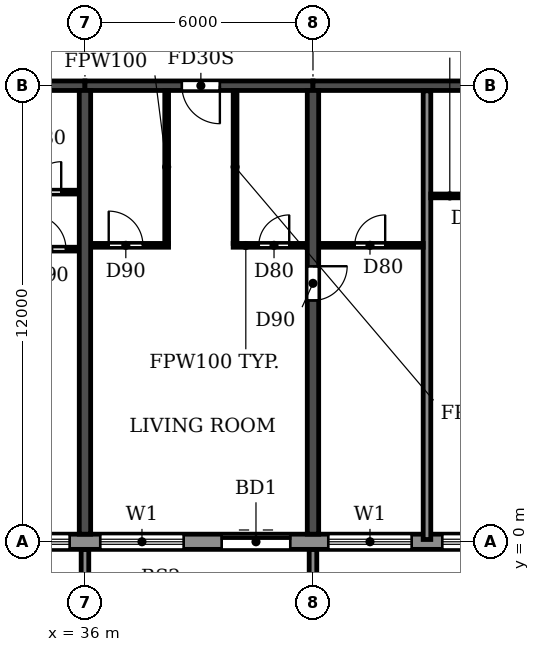
"""IFC4 building model, lengths in metres.
Left out: names, types, materials, properties, quantities, classifications, styles, units other than length and angle.
Written with IfcOpenShell. Run it as: python <this file> out.ifc"""

import sys

from ifc_helpers import new_model, si_unit, direction, frame, frame_2d, origin, place, context, subcontext, project, spatial, polyline, rectangle, outline, extrude, source, transform, mapped, element, fill, save


model = new_model("IFC4")
c1 = context("Model", 3, precision=1e-05, world=origin(), true_north=direction((0.0, 1.0)))
c2 = subcontext(c1, "Body", "Model", "MODEL_VIEW")
j1 = project(units=[si_unit("LENGTHUNIT", "METRE"), si_unit("PLANEANGLEUNIT", "RADIAN")], contexts=[c1])
p1 = place(None, origin())
s1 = spatial("IfcSite", under=j1, at=p1, CompositionType="ELEMENT")
p2 = place(p1, origin())
s2 = spatial("IfcBuilding", under=s1, at=p2, CompositionType="ELEMENT")
p3 = place(p2, frame((0.0, 0.0, 125.7)))
s3 = spatial("IfcBuildingStorey", under=s2, at=p3, CompositionType="ELEMENT", Elevation=125.7)
p4 = place(p3, frame((36.0, 0.2, 0.0), z_axis=(0.0, 0.0, 1.0), x_axis=(0.0, 1.0, 0.0)))
e1 = element("IfcWall", 1, at=p4, inside=s3, PredefinedType="SHEAR", context=c2, shape_type="SweptSolid", body=[
    extrude(rectangle(XDim=11.675, YDim=0.3, at=frame_2d((5.837, 0.0))), origin(), (0.0, 0.0, 1.0), 3.07),
])
p5 = place(p3, frame((42.0, 0.2, 0.0), z_axis=(0.0, 0.0, 1.0), x_axis=(0.0, 1.0, 0.0)))
e2 = element("IfcWall", 2, at=p5, inside=s3, PredefinedType="SHEAR", context=c2, shape_type="SweptSolid", body=[
    extrude(rectangle(XDim=11.675, YDim=0.3, at=frame_2d((5.837, 0.0))), origin(), (0.0, 0.0, 1.0), 3.07),
])
p6 = place(p5, frame((6.15, 0.0, 0.0)))
e3 = element("IfcOpeningElement", 3, at=p6, cuts=e2, PredefinedType="OPENING", context=c2, shape_type="SweptSolid", body=[
    extrude(rectangle(XDim=0.9, YDim=2.1, at=frame_2d((0.45, 1.05))), frame((0.0, 0.16, 0.0), z_axis=(0.0, -1.0, 0.0), x_axis=(1.0, 0.0, 0.0)), (0.0, 0.0, 1.0), 0.32),
])
p7 = place(p3, frame((30.0, 12.0, 0.0), z_axis=(0.0, 0.0, 1.0), x_axis=(1.0, 0.0, 0.0)))
e4 = element("IfcWall", 4, at=p7, inside=s3, PredefinedType="SHEAR", context=c2, shape_type="SweptSolid", body=[
    extrude(rectangle(XDim=6.0, YDim=0.25, at=frame_2d((3.0, 0.0))), origin(), (0.0, 0.0, 1.0), 2.47),
])
p8 = place(p7, frame((2.55, 0.0, 0.0)))
e5 = element("IfcOpeningElement", 5, at=p8, cuts=e4, PredefinedType="OPENING", context=c2, shape_type="SweptSolid", body=[
    extrude(rectangle(XDim=1.0, YDim=2.1, at=frame_2d((0.5, 1.05))), frame((0.0, 0.135, 0.0), z_axis=(0.0, -1.0, 0.0), x_axis=(1.0, 0.0, 0.0)), (0.0, 0.0, 1.0), 0.27),
])
p9 = place(p3, frame((36.0, 12.0, 0.0), z_axis=(0.0, 0.0, 1.0), x_axis=(1.0, 0.0, 0.0)))
e6 = element("IfcWall", 6, at=p9, inside=s3, PredefinedType="SHEAR", context=c2, shape_type="SweptSolid", body=[
    extrude(rectangle(XDim=6.0, YDim=0.25, at=frame_2d((3.0, 0.0))), origin(), (0.0, 0.0, 1.0), 2.47),
])
p10 = place(p9, frame((2.55, 0.0, 0.0)))
e7 = element("IfcOpeningElement", 7, at=p10, cuts=e6, PredefinedType="OPENING", context=c2, shape_type="SweptSolid", body=[
    extrude(rectangle(XDim=1.0, YDim=2.1, at=frame_2d((0.5, 1.05))), frame((0.0, 0.135, 0.0), z_axis=(0.0, -1.0, 0.0), x_axis=(1.0, 0.0, 0.0)), (0.0, 0.0, 1.0), 0.27),
])
p11 = place(p3, frame((42.0, 12.0, 0.0), z_axis=(0.0, 0.0, 1.0), x_axis=(1.0, 0.0, 0.0)))
e8 = element("IfcWall", 8, at=p11, inside=s3, PredefinedType="SHEAR", context=c2, shape_type="SweptSolid", body=[
    extrude(rectangle(XDim=6.0, YDim=0.25, at=frame_2d((3.0, 0.0))), origin(), (0.0, 0.0, 1.0), 2.47),
])
p12 = place(p3, frame((16.683, 0.0, 0.0), z_axis=(0.0, 0.0, 1.0), x_axis=(1.0, 0.0, 0.0)))
e9 = element("IfcWall", 9, at=p12, inside=s3, PredefinedType="STANDARD", context=c2, shape_type="SweptSolid", body=[
    extrude(rectangle(XDim=68.634, YDim=0.4, at=frame_2d((34.317, 0.0))), origin(), (0.0, 0.0, 1.0), 3.07),
])
p13 = place(p12, frame((1.717, 0.0, 0.9)))
e10 = element("IfcOpeningElement", 10, at=p13, cuts=e9, PredefinedType="OPENING", context=c2, shape_type="SweptSolid", body=[
    extrude(rectangle(XDim=2.2, YDim=1.5, at=frame_2d((1.1, 0.75))), frame((0.0, 0.21, 0.0), z_axis=(0.0, -1.0, 0.0), x_axis=(1.0, 0.0, 0.0)), (0.0, 0.0, 1.0), 0.42),
])
p14 = place(p12, frame((4.717, 0.0, 0.9)))
e11 = element("IfcOpeningElement", 11, at=p14, cuts=e9, PredefinedType="OPENING", context=c2, shape_type="SweptSolid", body=[
    extrude(rectangle(XDim=2.2, YDim=1.5, at=frame_2d((1.1, 0.75))), frame((0.0, 0.21, 0.0), z_axis=(0.0, -1.0, 0.0), x_axis=(1.0, 0.0, 0.0)), (0.0, 0.0, 1.0), 0.42),
])
p15 = place(p12, frame((7.717, 0.0, 0.9)))
e12 = element("IfcOpeningElement", 12, at=p15, cuts=e9, PredefinedType="OPENING", context=c2, shape_type="SweptSolid", body=[
    extrude(rectangle(XDim=2.2, YDim=1.5, at=frame_2d((1.1, 0.75))), frame((0.0, 0.21, 0.0), z_axis=(0.0, -1.0, 0.0), x_axis=(1.0, 0.0, 0.0)), (0.0, 0.0, 1.0), 0.42),
])
p16 = place(p12, frame((10.717, 0.0, 0.9)))
e13 = element("IfcOpeningElement", 13, at=p16, cuts=e9, PredefinedType="OPENING", context=c2, shape_type="SweptSolid", body=[
    extrude(rectangle(XDim=2.2, YDim=1.5, at=frame_2d((1.1, 0.75))), frame((0.0, 0.21, 0.0), z_axis=(0.0, -1.0, 0.0), x_axis=(1.0, 0.0, 0.0)), (0.0, 0.0, 1.0), 0.42),
])
p17 = place(p12, frame((13.717, 0.0, 0.9)))
e14 = element("IfcOpeningElement", 14, at=p17, cuts=e9, PredefinedType="OPENING", context=c2, shape_type="SweptSolid", body=[
    extrude(rectangle(XDim=2.2, YDim=1.5, at=frame_2d((1.1, 0.75))), frame((0.0, 0.21, 0.0), z_axis=(0.0, -1.0, 0.0), x_axis=(1.0, 0.0, 0.0)), (0.0, 0.0, 1.0), 0.42),
])
p18 = place(p12, frame((16.717, 0.0, 0.9)))
e15 = element("IfcOpeningElement", 15, at=p18, cuts=e9, PredefinedType="OPENING", context=c2, shape_type="SweptSolid", body=[
    extrude(rectangle(XDim=2.2, YDim=1.5, at=frame_2d((1.1, 0.75))), frame((0.0, 0.21, 0.0), z_axis=(0.0, -1.0, 0.0), x_axis=(1.0, 0.0, 0.0)), (0.0, 0.0, 1.0), 0.42),
])
p19 = place(p12, frame((19.717, 0.0, 0.9)))
e16 = element("IfcOpeningElement", 16, at=p19, cuts=e9, PredefinedType="OPENING", context=c2, shape_type="SweptSolid", body=[
    extrude(rectangle(XDim=2.2, YDim=1.5, at=frame_2d((1.1, 0.75))), frame((0.0, 0.21, 0.0), z_axis=(0.0, -1.0, 0.0), x_axis=(1.0, 0.0, 0.0)), (0.0, 0.0, 1.0), 0.42),
])
p20 = place(p12, frame((22.917, 0.0, 0.0)))
e17 = element("IfcOpeningElement", 17, at=p20, cuts=e9, PredefinedType="OPENING", context=c2, shape_type="SweptSolid", body=[
    extrude(rectangle(XDim=1.8, YDim=2.4, at=frame_2d((0.9, 1.2))), frame((0.0, 0.21, 0.0), z_axis=(0.0, -1.0, 0.0), x_axis=(1.0, 0.0, 0.0)), (0.0, 0.0, 1.0), 0.42),
])
p21 = place(p12, frame((25.717, 0.0, 0.9)))
e18 = element("IfcOpeningElement", 18, at=p21, cuts=e9, PredefinedType="OPENING", context=c2, shape_type="SweptSolid", body=[
    extrude(rectangle(XDim=2.2, YDim=1.5, at=frame_2d((1.1, 0.75))), frame((0.0, 0.21, 0.0), z_axis=(0.0, -1.0, 0.0), x_axis=(1.0, 0.0, 0.0)), (0.0, 0.0, 1.0), 0.42),
])
p22 = place(p12, frame((28.717, 0.0, 0.9)))
e19 = element("IfcOpeningElement", 19, at=p22, cuts=e9, PredefinedType="OPENING", context=c2, shape_type="SweptSolid", body=[
    extrude(rectangle(XDim=2.2, YDim=1.5, at=frame_2d((1.1, 0.75))), frame((0.0, 0.21, 0.0), z_axis=(0.0, -1.0, 0.0), x_axis=(1.0, 0.0, 0.0)), (0.0, 0.0, 1.0), 0.42),
])
p23 = place(p12, frame((31.717, 0.0, 0.9)))
e20 = element("IfcOpeningElement", 20, at=p23, cuts=e9, PredefinedType="OPENING", context=c2, shape_type="SweptSolid", body=[
    extrude(rectangle(XDim=2.2, YDim=1.5, at=frame_2d((1.1, 0.75))), frame((0.0, 0.21, 0.0), z_axis=(0.0, -1.0, 0.0), x_axis=(1.0, 0.0, 0.0)), (0.0, 0.0, 1.0), 0.42),
])
p24 = place(p12, frame((34.917, 0.0, 0.0)))
e21 = element("IfcOpeningElement", 21, at=p24, cuts=e9, PredefinedType="OPENING", context=c2, shape_type="SweptSolid", body=[
    extrude(rectangle(XDim=1.8, YDim=2.4, at=frame_2d((0.9, 1.2))), frame((0.0, 0.21, 0.0), z_axis=(0.0, -1.0, 0.0), x_axis=(1.0, 0.0, 0.0)), (0.0, 0.0, 1.0), 0.42),
])
p25 = place(p12, frame((37.717, 0.0, 0.9)))
e22 = element("IfcOpeningElement", 22, at=p25, cuts=e9, PredefinedType="OPENING", context=c2, shape_type="SweptSolid", body=[
    extrude(rectangle(XDim=2.2, YDim=1.5, at=frame_2d((1.1, 0.75))), frame((0.0, 0.21, 0.0), z_axis=(0.0, -1.0, 0.0), x_axis=(1.0, 0.0, 0.0)), (0.0, 0.0, 1.0), 0.42),
])
p26 = place(p12, frame((40.717, 0.0, 0.9)))
e23 = element("IfcOpeningElement", 23, at=p26, cuts=e9, PredefinedType="OPENING", context=c2, shape_type="SweptSolid", body=[
    extrude(rectangle(XDim=2.2, YDim=1.5, at=frame_2d((1.1, 0.75))), frame((0.0, 0.21, 0.0), z_axis=(0.0, -1.0, 0.0), x_axis=(1.0, 0.0, 0.0)), (0.0, 0.0, 1.0), 0.42),
])
p27 = place(p12, frame((43.717, 0.0, 0.9)))
e24 = element("IfcOpeningElement", 24, at=p27, cuts=e9, PredefinedType="OPENING", context=c2, shape_type="SweptSolid", body=[
    extrude(rectangle(XDim=2.2, YDim=1.5, at=frame_2d((1.1, 0.75))), frame((0.0, 0.21, 0.0), z_axis=(0.0, -1.0, 0.0), x_axis=(1.0, 0.0, 0.0)), (0.0, 0.0, 1.0), 0.42),
])
p28 = place(p12, frame((46.917, 0.0, 0.0)))
e25 = element("IfcOpeningElement", 25, at=p28, cuts=e9, PredefinedType="OPENING", context=c2, shape_type="SweptSolid", body=[
    extrude(rectangle(XDim=1.8, YDim=2.4, at=frame_2d((0.9, 1.2))), frame((0.0, 0.21, 0.0), z_axis=(0.0, -1.0, 0.0), x_axis=(1.0, 0.0, 0.0)), (0.0, 0.0, 1.0), 0.42),
])
p29 = place(p12, frame((49.717, 0.0, 0.9)))
e26 = element("IfcOpeningElement", 26, at=p29, cuts=e9, PredefinedType="OPENING", context=c2, shape_type="SweptSolid", body=[
    extrude(rectangle(XDim=2.2, YDim=1.5, at=frame_2d((1.1, 0.75))), frame((0.0, 0.21, 0.0), z_axis=(0.0, -1.0, 0.0), x_axis=(1.0, 0.0, 0.0)), (0.0, 0.0, 1.0), 0.42),
])
p30 = place(p12, frame((52.717, 0.0, 0.9)))
e27 = element("IfcOpeningElement", 27, at=p30, cuts=e9, PredefinedType="OPENING", context=c2, shape_type="SweptSolid", body=[
    extrude(rectangle(XDim=2.2, YDim=1.5, at=frame_2d((1.1, 0.75))), frame((0.0, 0.21, 0.0), z_axis=(0.0, -1.0, 0.0), x_axis=(1.0, 0.0, 0.0)), (0.0, 0.0, 1.0), 0.42),
])
p31 = place(p12, frame((55.717, 0.0, 0.9)))
e28 = element("IfcOpeningElement", 28, at=p31, cuts=e9, PredefinedType="OPENING", context=c2, shape_type="SweptSolid", body=[
    extrude(rectangle(XDim=2.2, YDim=1.5, at=frame_2d((1.1, 0.75))), frame((0.0, 0.21, 0.0), z_axis=(0.0, -1.0, 0.0), x_axis=(1.0, 0.0, 0.0)), (0.0, 0.0, 1.0), 0.42),
])
p32 = place(p12, frame((58.917, 0.0, 0.0)))
e29 = element("IfcOpeningElement", 29, at=p32, cuts=e9, PredefinedType="OPENING", context=c2, shape_type="SweptSolid", body=[
    extrude(rectangle(XDim=1.8, YDim=2.4, at=frame_2d((0.9, 1.2))), frame((0.0, 0.21, 0.0), z_axis=(0.0, -1.0, 0.0), x_axis=(1.0, 0.0, 0.0)), (0.0, 0.0, 1.0), 0.42),
])
p33 = place(p12, frame((61.717, 0.0, 0.9)))
e30 = element("IfcOpeningElement", 30, at=p33, cuts=e9, PredefinedType="OPENING", context=c2, shape_type="SweptSolid", body=[
    extrude(rectangle(XDim=2.2, YDim=1.5, at=frame_2d((1.1, 0.75))), frame((0.0, 0.21, 0.0), z_axis=(0.0, -1.0, 0.0), x_axis=(1.0, 0.0, 0.0)), (0.0, 0.0, 1.0), 0.42),
])
p34 = place(p12, frame((64.717, 0.0, 0.9)))
e31 = element("IfcOpeningElement", 31, at=p34, cuts=e9, PredefinedType="OPENING", context=c2, shape_type="SweptSolid", body=[
    extrude(rectangle(XDim=2.2, YDim=1.5, at=frame_2d((1.1, 0.75))), frame((0.0, 0.21, 0.0), z_axis=(0.0, -1.0, 0.0), x_axis=(1.0, 0.0, 0.0)), (0.0, 0.0, 1.0), 0.42),
])
m1 = source(origin(), c2, "Body", "SweptSolid", [
    extrude(outline(polyline([(0.0, 0.0), (0.2, 0.0), (0.2, 1.65), (0.0, 1.65), (0.0, 0.0)])), origin(), (0.0, 0.0, 1.0), 3.1),
])
for number, where in (
    (32, (35.9, -1.85, 0.0)),
    (33, (41.9, -1.85, 0.0)),
):
    element("IfcWall", number, at=place(p3, frame(where)), inside=s3, PredefinedType="STANDARD", context=c2, shape_type="MappedRepresentation", body=[
        mapped(m1, transform((0.0, 0.0, 0.0))),
    ])
p35 = place(p3, frame((45.0, 0.06, 0.0), z_axis=(0.0, 0.0, 1.0), x_axis=(0.0, 1.0, 0.0)))
e34 = element("IfcWall", 34, at=p35, inside=s3, PredefinedType="PARTITIONING", context=c2, shape_type="SweptSolid", body=[
    extrude(rectangle(XDim=11.805, YDim=0.2, at=frame_2d((5.902, 0.0))), origin(), (0.0, 0.0, 1.0), 3.07),
])
p36 = place(p3, frame((32.95, 7.7, 0.0), z_axis=(0.0, 0.0, 1.0), x_axis=(1.0, 0.0, 0.0)))
e35 = element("IfcWall", 35, at=p36, inside=s3, PredefinedType="PARTITIONING", context=c2, shape_type="SweptSolid", body=[
    extrude(rectangle(XDim=2.89, YDim=0.1, at=frame_2d((1.445, 0.0))), origin(), (0.0, 0.0, 1.0), 3.07),
])
p37 = place(p36, frame((1.65, 0.0, 0.0)))
e36 = element("IfcOpeningElement", 36, at=p37, cuts=e35, PredefinedType="OPENING", context=c2, shape_type="SweptSolid", body=[
    extrude(rectangle(XDim=0.9, YDim=2.1, at=frame_2d((0.45, 1.05))), frame((0.0, 0.06, 0.0), z_axis=(0.0, -1.0, 0.0), x_axis=(1.0, 0.0, 0.0)), (0.0, 0.0, 1.0), 0.12),
])
p38 = place(p3, frame((36.16, 7.8, 0.0), z_axis=(0.0, 0.0, 1.0), x_axis=(1.0, 0.0, 0.0)))
e37 = element("IfcWall", 37, at=p38, inside=s3, PredefinedType="PARTITIONING", context=c2, shape_type="SweptSolid", body=[
    extrude(rectangle(XDim=2.04, YDim=0.1, at=frame_2d((1.02, 0.0))), origin(), (0.0, 0.0, 1.0), 3.07),
])
p39 = place(p38, frame((0.465, 0.0, 0.0)))
e38 = element("IfcOpeningElement", 38, at=p39, cuts=e37, PredefinedType="OPENING", context=c2, shape_type="SweptSolid", body=[
    extrude(rectangle(XDim=0.9, YDim=2.1, at=frame_2d((0.45, 1.05))), frame((0.0, 0.06, 0.0), z_axis=(0.0, -1.0, 0.0), x_axis=(1.0, 0.0, 0.0)), (0.0, 0.0, 1.0), 0.12),
])
p40 = place(p3, frame((39.9, 7.8, 0.0), z_axis=(0.0, 0.0, 1.0), x_axis=(1.0, 0.0, 0.0)))
e39 = element("IfcWall", 39, at=p40, inside=s3, PredefinedType="PARTITIONING", context=c2, shape_type="SweptSolid", body=[
    extrude(rectangle(XDim=1.94, YDim=0.1, at=frame_2d((0.97, 0.0))), origin(), (0.0, 0.0, 1.0), 3.07),
])
p41 = place(p40, frame((0.675, 0.0, 0.0)))
e40 = element("IfcOpeningElement", 40, at=p41, cuts=e39, PredefinedType="OPENING", context=c2, shape_type="SweptSolid", body=[
    extrude(rectangle(XDim=0.8, YDim=2.1, at=frame_2d((0.4, 1.05))), frame((0.0, 0.06, 0.0), z_axis=(0.0, -1.0, 0.0), x_axis=(1.0, 0.0, 0.0)), (0.0, 0.0, 1.0), 0.12),
])
p42 = place(p3, frame((42.16, 7.8, 0.0), z_axis=(0.0, 0.0, 1.0), x_axis=(1.0, 0.0, 0.0)))
e41 = element("IfcWall", 41, at=p42, inside=s3, PredefinedType="PARTITIONING", context=c2, shape_type="SweptSolid", body=[
    extrude(rectangle(XDim=2.74, YDim=0.1, at=frame_2d((1.37, 0.0))), origin(), (0.0, 0.0, 1.0), 3.07),
])
p43 = place(p42, frame((0.94, 0.0, 0.0)))
e42 = element("IfcOpeningElement", 42, at=p43, cuts=e41, PredefinedType="OPENING", context=c2, shape_type="SweptSolid", body=[
    extrude(rectangle(XDim=0.8, YDim=2.1, at=frame_2d((0.4, 1.05))), frame((0.0, 0.06, 0.0), z_axis=(0.0, -1.0, 0.0), x_axis=(1.0, 0.0, 0.0)), (0.0, 0.0, 1.0), 0.12),
])
p44 = place(p3, frame((45.1, 9.1, 0.0), z_axis=(0.0, 0.0, 1.0), x_axis=(1.0, 0.0, 0.0)))
e43 = element("IfcWall", 43, at=p44, inside=s3, PredefinedType="PARTITIONING", context=c2, shape_type="SweptSolid", body=[
    extrude(rectangle(XDim=2.74, YDim=0.1, at=frame_2d((1.37, 0.0))), origin(), (0.0, 0.0, 1.0), 3.07),
])
p45 = place(p44, frame((1.0, 0.0, 0.0)))
e44 = element("IfcOpeningElement", 44, at=p45, cuts=e43, PredefinedType="OPENING", context=c2, shape_type="SweptSolid", body=[
    extrude(rectangle(XDim=0.8, YDim=2.1, at=frame_2d((0.4, 1.05))), frame((0.0, 0.06, 0.0), z_axis=(0.0, -1.0, 0.0), x_axis=(1.0, 0.0, 0.0)), (0.0, 0.0, 1.0), 0.12),
])
p46 = place(p3, frame((33.9, 9.2, 0.0), z_axis=(0.0, 0.0, 1.0), x_axis=(1.0, 0.0, 0.0)))
e45 = element("IfcWall", 45, at=p46, inside=s3, PredefinedType="PARTITIONING", context=c2, shape_type="SweptSolid", body=[
    extrude(rectangle(XDim=1.94, YDim=0.1, at=frame_2d((0.97, 0.0))), origin(), (0.0, 0.0, 1.0), 3.07),
])
p47 = place(p46, frame((0.675, 0.0, 0.0)))
e46 = element("IfcOpeningElement", 46, at=p47, cuts=e45, PredefinedType="OPENING", context=c2, shape_type="SweptSolid", body=[
    extrude(rectangle(XDim=0.8, YDim=2.1, at=frame_2d((0.4, 1.05))), frame((0.0, 0.06, 0.0), z_axis=(0.0, -1.0, 0.0), x_axis=(1.0, 0.0, 0.0)), (0.0, 0.0, 1.0), 0.12),
])
for number, where, z_axis, x_axis in (
    (47, (38.15, 7.85, 0.0), (0.0, 0.0, 1.0), (0.0, 1.0, 0.0)),
    (48, (39.95, 7.85, 0.0), (0.0, 0.0, 1.0), (0.0, 1.0, 0.0)),
):
    element("IfcWall", number, at=place(p3, frame(where, z_axis=z_axis, x_axis=x_axis)), inside=s3, PredefinedType="PARTITIONING", context=c2, shape_type="SweptSolid", body=[
        extrude(rectangle(XDim=4.015, YDim=0.1, at=frame_2d((2.007, 0.0))), origin(), (0.0, 0.0, 1.0), 3.07),
    ])
p48 = place(p18, origin())
e49 = element("IfcWindow", 49, at=p48, inside=s3, PartitioningType="DOUBLE_PANEL_HORIZONTAL", PredefinedType="WINDOW", context=c2, shape_type="SweptSolid", body=[
    extrude(rectangle(XDim=2.2, YDim=1.5, at=frame_2d((1.1, 0.75))), frame((0.0, 0.03, 0.0), z_axis=(0.0, -1.0, 0.0), x_axis=(1.0, 0.0, 0.0)), (0.0, 0.0, 1.0), 0.06),
])
fill(e15, e49)
p49 = place(p19, origin())
e50 = element("IfcWindow", 50, at=p49, inside=s3, PartitioningType="DOUBLE_PANEL_HORIZONTAL", PredefinedType="WINDOW", context=c2, shape_type="SweptSolid", body=[
    extrude(rectangle(XDim=2.2, YDim=1.5, at=frame_2d((1.1, 0.75))), frame((0.0, 0.03, 0.0), z_axis=(0.0, -1.0, 0.0), x_axis=(1.0, 0.0, 0.0)), (0.0, 0.0, 1.0), 0.06),
])
fill(e16, e50)
p50 = place(p20, origin())
e51 = element("IfcDoor", 51, at=p50, inside=s3, OperationType="DOUBLE_DOOR_SLIDING", PredefinedType="DOOR", context=c2, shape_type="SweptSolid", body=[
    extrude(rectangle(XDim=1.8, YDim=2.4, at=frame_2d((0.9, 1.2))), frame((0.0, 0.025, 0.0), z_axis=(0.0, -1.0, 0.0), x_axis=(1.0, 0.0, 0.0)), (0.0, 0.0, 1.0), 0.05),
])
fill(e17, e51)
p51 = place(p21, origin())
e52 = element("IfcWindow", 52, at=p51, inside=s3, PartitioningType="DOUBLE_PANEL_HORIZONTAL", PredefinedType="WINDOW", context=c2, shape_type="SweptSolid", body=[
    extrude(rectangle(XDim=2.2, YDim=1.5, at=frame_2d((1.1, 0.75))), frame((0.0, 0.03, 0.0), z_axis=(0.0, -1.0, 0.0), x_axis=(1.0, 0.0, 0.0)), (0.0, 0.0, 1.0), 0.06),
])
fill(e18, e52)
p52 = place(p22, origin())
e53 = element("IfcWindow", 53, at=p52, inside=s3, PartitioningType="DOUBLE_PANEL_HORIZONTAL", PredefinedType="WINDOW", context=c2, shape_type="SweptSolid", body=[
    extrude(rectangle(XDim=2.2, YDim=1.5, at=frame_2d((1.1, 0.75))), frame((0.0, 0.03, 0.0), z_axis=(0.0, -1.0, 0.0), x_axis=(1.0, 0.0, 0.0)), (0.0, 0.0, 1.0), 0.06),
])
fill(e19, e53)
p53 = place(p47, origin())
e54 = element("IfcDoor", 54, at=p53, inside=s3, OperationType="SINGLE_SWING_RIGHT", PredefinedType="DOOR", context=c2, shape_type="SweptSolid", body=[
    extrude(rectangle(XDim=0.8, YDim=2.1, at=frame_2d((0.4, 1.05))), frame((0.0, 0.025, 0.0), z_axis=(0.0, -1.0, 0.0), x_axis=(1.0, 0.0, 0.0)), (0.0, 0.0, 1.0), 0.05),
])
fill(e46, e54)
p54 = place(p37, origin())
e55 = element("IfcDoor", 55, at=p54, inside=s3, OperationType="SINGLE_SWING_LEFT", PredefinedType="DOOR", context=c2, shape_type="SweptSolid", body=[
    extrude(rectangle(XDim=0.9, YDim=2.1, at=frame_2d((0.45, 1.05))), frame((0.0, 0.025, 0.0), z_axis=(0.0, -1.0, 0.0), x_axis=(1.0, 0.0, 0.0)), (0.0, 0.0, 1.0), 0.05),
])
fill(e36, e55)
p55 = place(p43, origin())
e56 = element("IfcDoor", 56, at=p55, inside=s3, OperationType="SINGLE_SWING_RIGHT", PredefinedType="DOOR", context=c2, shape_type="SweptSolid", body=[
    extrude(rectangle(XDim=0.8, YDim=2.1, at=frame_2d((0.4, 1.05))), frame((0.0, 0.025, 0.0), z_axis=(0.0, -1.0, 0.0), x_axis=(1.0, 0.0, 0.0)), (0.0, 0.0, 1.0), 0.05),
])
fill(e42, e56)
p56 = place(p39, origin())
e57 = element("IfcDoor", 57, at=p56, inside=s3, OperationType="SINGLE_SWING_LEFT", PredefinedType="DOOR", context=c2, shape_type="SweptSolid", body=[
    extrude(rectangle(XDim=0.9, YDim=2.1, at=frame_2d((0.45, 1.05))), frame((0.0, 0.025, 0.0), z_axis=(0.0, -1.0, 0.0), x_axis=(1.0, 0.0, 0.0)), (0.0, 0.0, 1.0), 0.05),
])
fill(e38, e57)
p57 = place(p10, frame((1.0, 0.0, 0.0), z_axis=(0.0, 0.0, 1.0), x_axis=(-1.0, 0.0, 0.0)))
e58 = element("IfcDoor", 58, at=p57, inside=s3, OperationType="SINGLE_SWING_LEFT", PredefinedType="DOOR", context=c2, shape_type="SweptSolid", body=[
    extrude(rectangle(XDim=1.0, YDim=2.1, at=frame_2d((0.5, 1.05))), frame((0.0, 0.025, 0.0), z_axis=(0.0, -1.0, 0.0), x_axis=(1.0, 0.0, 0.0)), (0.0, 0.0, 1.0), 0.05),
])
fill(e7, e58)
p58 = place(p41, origin())
e59 = element("IfcDoor", 59, at=p58, inside=s3, OperationType="SINGLE_SWING_RIGHT", PredefinedType="DOOR", context=c2, shape_type="SweptSolid", body=[
    extrude(rectangle(XDim=0.8, YDim=2.1, at=frame_2d((0.4, 1.05))), frame((0.0, 0.025, 0.0), z_axis=(0.0, -1.0, 0.0), x_axis=(1.0, 0.0, 0.0)), (0.0, 0.0, 1.0), 0.05),
])
fill(e40, e59)
p59 = place(p6, frame((0.9, 0.0, 0.0), z_axis=(0.0, 0.0, 1.0), x_axis=(-1.0, 0.0, 0.0)))
e60 = element("IfcDoor", 60, at=p59, inside=s3, OperationType="SINGLE_SWING_LEFT", PredefinedType="DOOR", context=c2, shape_type="SweptSolid", body=[
    extrude(rectangle(XDim=0.9, YDim=2.1, at=frame_2d((0.45, 1.05))), frame((0.0, 0.025, 0.0), z_axis=(0.0, -1.0, 0.0), x_axis=(1.0, 0.0, 0.0)), (0.0, 0.0, 1.0), 0.05),
])
fill(e3, e60)
save(model, sys.argv[1])
